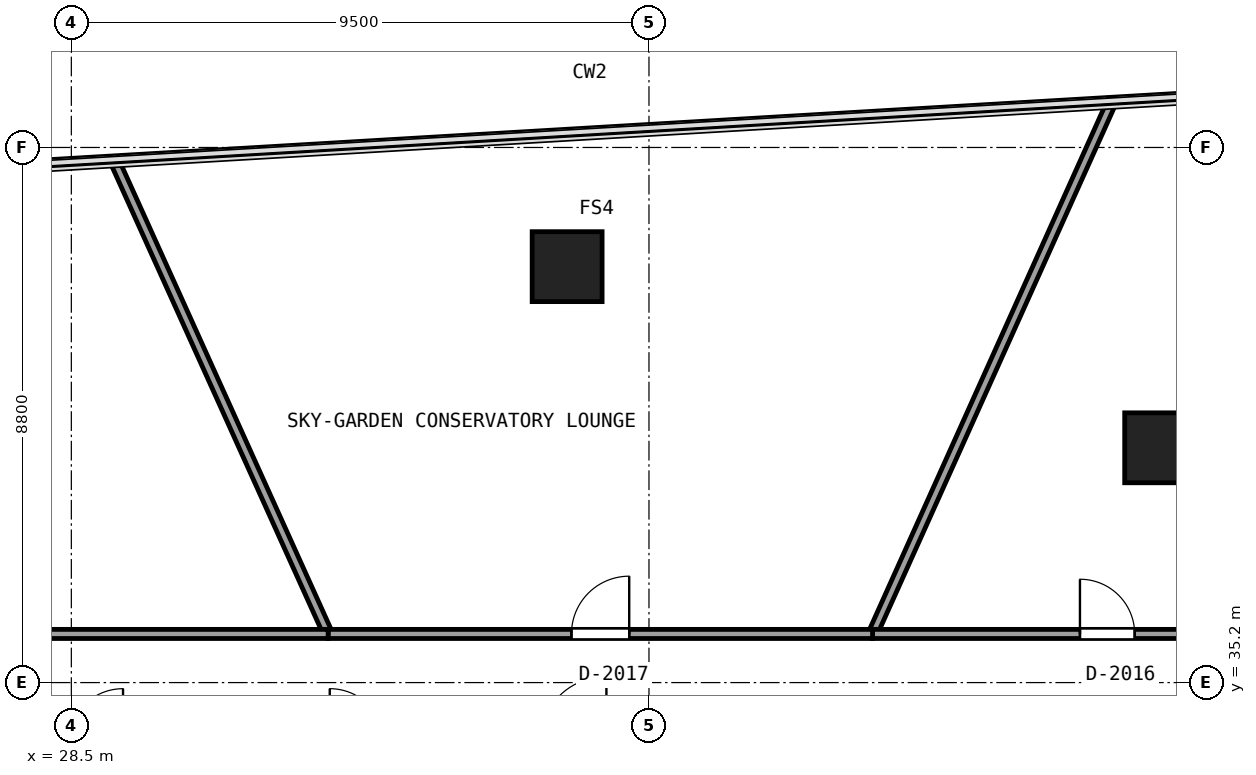
"""IFC4 building model, lengths in metres.
Left out: names, types, materials, properties, quantities, classifications, styles, units other than length and angle.
Written with IfcOpenShell. Run it as: python <this file> out.ifc"""

import sys

from ifc_helpers import new_model, si_unit, direction, frame, frame_2d, origin, origin_2d, place, context, subcontext, project, spatial, rectangle, extrude, element, fill, save


model = new_model("IFC4")
c1 = context("Model", 3, precision=1e-05, world=origin(), true_north=direction((0.0, 1.0)))
c2 = subcontext(c1, "Body", "Model", "MODEL_VIEW")
j1 = project(units=[si_unit("LENGTHUNIT", "METRE"), si_unit("PLANEANGLEUNIT", "RADIAN")], contexts=[c1])
p1 = place(None, origin())
s1 = spatial("IfcSite", under=j1, at=p1, CompositionType="ELEMENT")
p2 = place(p1, origin())
s2 = spatial("IfcBuilding", under=s1, at=p2, CompositionType="ELEMENT")
p3 = place(p2, frame((0.0, 0.0, 79.8)))
s3 = spatial("IfcBuildingStorey", under=s2, at=p3, CompositionType="ELEMENT", Elevation=79.8)
for number, where, z_axis, x_axis in (
    (1, (46.399, 39.061, 0.0), (0.0, 0.0, 1.0), (1.0, 0.0, 0.0)),
    (2, (36.654, 42.04, 0.0), (0.0, 0.0, 1.0), (1.0, 0.0, 0.0)),
):
    element("IfcColumn", number, at=place(p3, frame(where, z_axis=z_axis, x_axis=x_axis)), inside=s3, PredefinedType="COLUMN", context=c2, shape_type="SweptSolid", body=[
        extrude(rectangle(XDim=1.15, YDim=1.15, at=origin_2d()), origin(), (0.0, 0.0, 1.0), 3.17),
    ])
p4 = place(p3, frame((45.622, 44.775, 0.0), z_axis=(0.0, 0.0, 1.0), x_axis=(-0.410050223095, -0.912062944396, 0.0)))
e3 = element("IfcWall", 3, at=p4, inside=s3, PredefinedType="PARTITIONING", context=c2, shape_type="SweptSolid", body=[
    extrude(rectangle(XDim=9.621, YDim=0.15, at=frame_2d((4.811, 0.0))), origin(), (0.0, 0.0, 1.0), 2.455),
])
p5 = place(p3, frame((41.677, 36.0, 0.0), z_axis=(0.0, 0.0, 1.0), x_axis=(1.0, 0.0, 0.0)))
e4 = element("IfcWall", 4, at=p5, inside=s3, PredefinedType="PARTITIONING", context=c2, shape_type="SweptSolid", body=[
    extrude(rectangle(XDim=7.723, YDim=0.15, at=frame_2d((3.861, 0.0))), origin(), (0.0, 0.0, 1.0), 2.455),
])
p6 = place(p5, frame((3.411, 0.0, 0.0)))
e5 = element("IfcOpeningElement", 5, at=p6, cuts=e4, PredefinedType="OPENING", context=c2, shape_type="SweptSolid", body=[
    extrude(rectangle(XDim=0.9, YDim=2.0, at=frame_2d((0.45, 1.0))), frame((0.0, 0.085, 0.0), z_axis=(0.0, -1.0, 0.0), x_axis=(1.0, 0.0, 0.0)), (0.0, 0.0, 1.0), 0.17),
])
p7 = place(p3, frame((29.197, 43.807, 0.0), z_axis=(0.0, 0.0, 1.0), x_axis=(0.411605049409, -0.911362322735, 0.0)))
e6 = element("IfcWall", 6, at=p7, inside=s3, PredefinedType="PARTITIONING", context=c2, shape_type="SweptSolid", body=[
    extrude(rectangle(XDim=8.566, YDim=0.15, at=frame_2d((4.283, 0.0))), origin(), (0.0, 0.0, 1.0), 2.455),
])
p8 = place(p3, frame((32.723, 36.0, 0.0), z_axis=(0.0, 0.0, 1.0), x_axis=(1.0, 0.0, 0.0)))
e7 = element("IfcWall", 7, at=p8, inside=s3, PredefinedType="PARTITIONING", context=c2, shape_type="SweptSolid", body=[
    extrude(rectangle(XDim=8.954, YDim=0.15, at=frame_2d((4.477, 0.0))), origin(), (0.0, 0.0, 1.0), 2.467),
])
p9 = place(p8, frame((4.002, 0.0, 0.0)))
e8 = element("IfcOpeningElement", 8, at=p9, cuts=e7, PredefinedType="OPENING", context=c2, shape_type="SweptSolid", body=[
    extrude(rectangle(XDim=0.95, YDim=2.15, at=frame_2d((0.475, 1.075))), frame((0.0, 0.085, 0.0), z_axis=(0.0, -1.0, 0.0), x_axis=(1.0, 0.0, 0.0)), (0.0, 0.0, 1.0), 0.17),
])
p10 = place(p3, frame((26.8, 36.0, 0.0), z_axis=(0.0, 0.0, 1.0), x_axis=(1.0, 0.0, 0.0)))
e9 = element("IfcWall", 9, at=p10, inside=s3, PredefinedType="PARTITIONING", context=c2, shape_type="SweptSolid", body=[
    extrude(rectangle(XDim=5.923, YDim=0.15, at=frame_2d((2.961, 0.0))), origin(), (0.0, 0.0, 1.0), 2.467),
])
p11 = place(p6, origin())
e10 = element("IfcDoor", 10, at=p11, inside=s3, OperationType="SINGLE_SWING_LEFT", PredefinedType="DOOR", context=c2, shape_type="SweptSolid", body=[
    extrude(rectangle(XDim=0.9, YDim=2.0, at=frame_2d((0.45, 1.0))), frame((0.0, 0.025, 0.0), z_axis=(0.0, -1.0, 0.0), x_axis=(1.0, 0.0, 0.0)), (0.0, 0.0, 1.0), 0.05),
])
fill(e5, e10)
p12 = place(p9, origin())
e11 = element("IfcDoor", 11, at=p12, inside=s3, OperationType="SINGLE_SWING_RIGHT", PredefinedType="DOOR", context=c2, shape_type="SweptSolid", body=[
    extrude(rectangle(XDim=0.95, YDim=2.15, at=frame_2d((0.475, 1.075))), frame((0.0, 0.025, 0.0), z_axis=(0.0, -1.0, 0.0), x_axis=(1.0, 0.0, 0.0)), (0.0, 0.0, 1.0), 0.05),
])
fill(e8, e11)
save(model, sys.argv[1])
